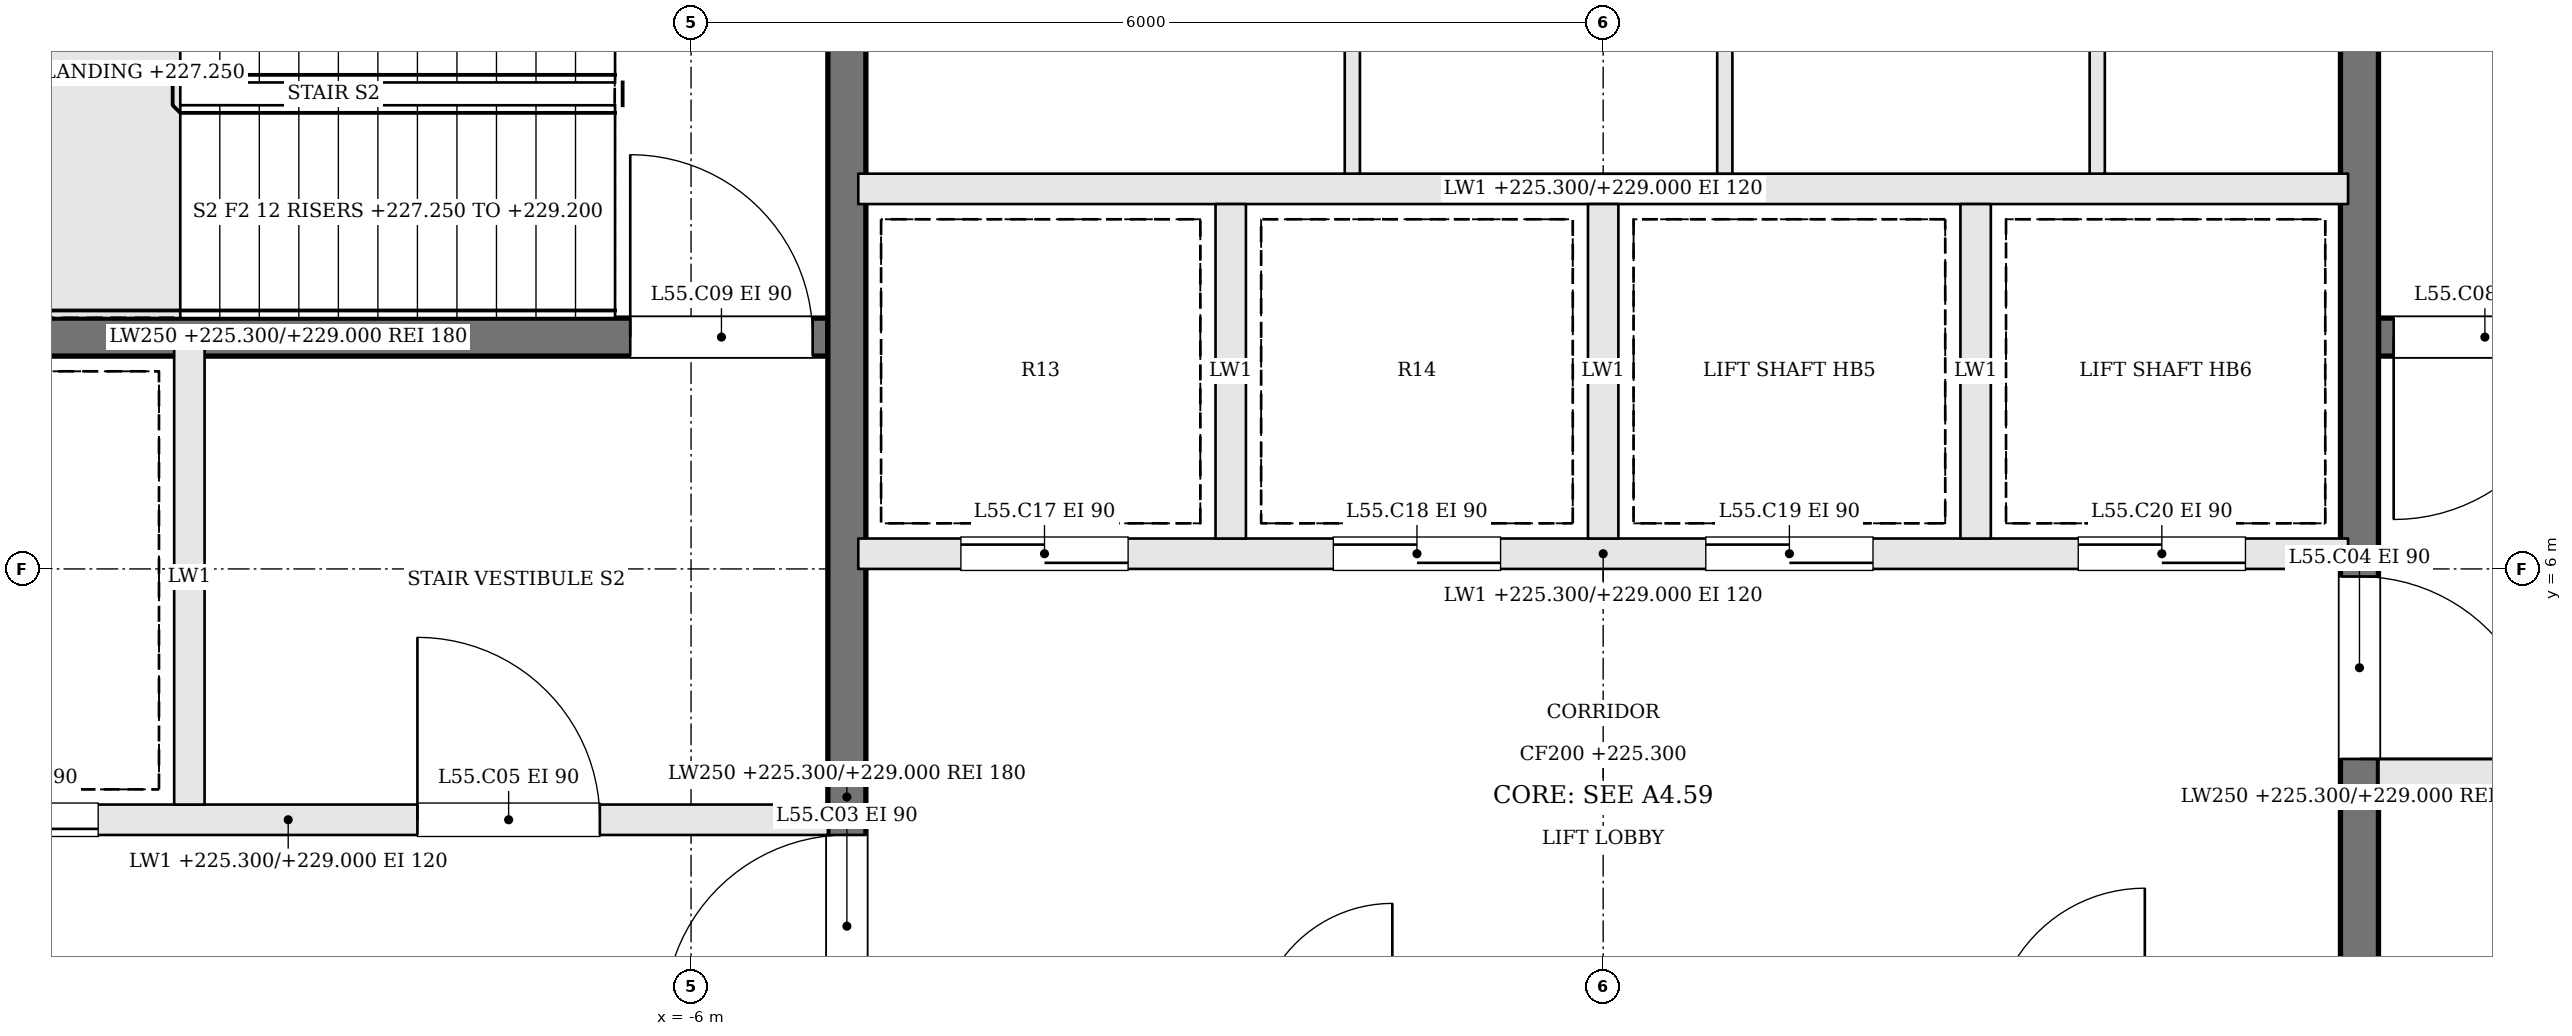
"""IFC4 building model, lengths in metres.
Left out: names, types, materials, properties, quantities, classifications, styles, units other than length and angle.
Written with IfcOpenShell. Run it as: python <this file> out.ifc"""

import sys

from ifc_helpers import new_model, si_unit, direction, frame, frame_2d, origin, place, context, subcontext, project, spatial, rectangle, extrude, element, fill, save


model = new_model("IFC4")
c1 = context("Model", 3, precision=1e-05, world=origin(), true_north=direction((0.0, 1.0)))
c2 = subcontext(c1, "Body", "Model", "MODEL_VIEW")
j1 = project(units=[si_unit("LENGTHUNIT", "METRE"), si_unit("PLANEANGLEUNIT", "RADIAN")], contexts=[c1])
p1 = place(None, origin())
s1 = spatial("IfcSite", under=j1, at=p1, CompositionType="ELEMENT")
p2 = place(p1, origin())
s2 = spatial("IfcBuilding", under=s1, at=p2, CompositionType="ELEMENT")
p3 = place(p2, frame((0.0, 0.0, 225.3)))
s3 = spatial("IfcBuildingStorey", under=s2, at=p3, CompositionType="ELEMENT", Elevation=225.3)
p4 = place(p3, frame((12.2, 7.525, 0.0), z_axis=(0.0, 0.0, 1.0), x_axis=(-1.0, 0.0, 0.0)))
e1 = element("IfcWall", 1, at=p4, inside=s3, PredefinedType="SOLIDWALL", context=c2, shape_type="SweptSolid", body=[
    extrude(rectangle(XDim=7.1, YDim=0.25, at=frame_2d((3.55, 0.0))), origin(), (0.0, 0.0, 1.0), 3.7),
])
p5 = place(p4, frame((5.8, 0.0, 0.0)))
e2 = element("IfcOpeningElement", 2, at=p5, cuts=e1, PredefinedType="OPENING", context=c2, shape_type="SweptSolid", body=[
    extrude(rectangle(XDim=1.2, YDim=2.1, at=frame_2d((0.6, 1.05))), frame((0.0, 0.135, 0.0), z_axis=(0.0, -1.0, 0.0), x_axis=(1.0, 0.0, 0.0)), (0.0, 0.0, 1.0), 0.27),
])
p6 = place(p3, frame((-12.2, 4.35, 0.0), z_axis=(0.0, 0.0, 1.0), x_axis=(1.0, 0.0, 0.0)))
e3 = element("IfcWall", 3, at=p6, inside=s3, PredefinedType="SOLIDWALL", context=c2, shape_type="SweptSolid", body=[
    extrude(rectangle(XDim=7.1, YDim=0.2, at=frame_2d((3.55, 0.0))), origin(), (0.0, 0.0, 1.0), 3.7),
])
p7 = place(p6, frame((4.4, 0.0, 0.0)))
e4 = element("IfcOpeningElement", 4, at=p7, cuts=e3, PredefinedType="OPENING", context=c2, shape_type="SweptSolid", body=[
    extrude(rectangle(XDim=1.2, YDim=2.1, at=frame_2d((0.6, 1.05))), frame((0.0, 0.11, 0.0), z_axis=(0.0, -1.0, 0.0), x_axis=(1.0, 0.0, 0.0)), (0.0, 0.0, 1.0), 0.22),
])
p8 = place(p6, frame((1.1, 0.0, 0.0)))
e5 = element("IfcOpeningElement", 5, at=p8, cuts=e3, PredefinedType="OPENING", context=c2, shape_type="SweptSolid", body=[
    extrude(rectangle(XDim=1.2, YDim=2.1, at=frame_2d((0.6, 1.05))), frame((0.0, 0.11, 0.0), z_axis=(0.0, -1.0, 0.0), x_axis=(1.0, 0.0, 0.0)), (0.0, 0.0, 1.0), 0.22),
])
p9 = place(p3, frame((12.2, 4.65, 0.0), z_axis=(0.0, 0.0, 1.0), x_axis=(-1.0, 0.0, 0.0)))
e6 = element("IfcWall", 6, at=p9, inside=s3, PredefinedType="SOLIDWALL", context=c2, shape_type="SweptSolid", body=[
    extrude(rectangle(XDim=7.1, YDim=0.2, at=frame_2d((3.55, 0.0))), origin(), (0.0, 0.0, 1.0), 3.7),
])
p10 = place(p9, frame((4.4, 0.0, 0.0)))
e7 = element("IfcOpeningElement", 7, at=p10, cuts=e6, PredefinedType="OPENING", context=c2, shape_type="SweptSolid", body=[
    extrude(rectangle(XDim=1.2, YDim=2.1, at=frame_2d((0.6, 1.05))), frame((0.0, 0.11, 0.0), z_axis=(0.0, -1.0, 0.0), x_axis=(1.0, 0.0, 0.0)), (0.0, 0.0, 1.0), 0.22),
])
p11 = place(p9, frame((1.1, 0.0, 0.0)))
e8 = element("IfcOpeningElement", 8, at=p11, cuts=e6, PredefinedType="OPENING", context=c2, shape_type="SweptSolid", body=[
    extrude(rectangle(XDim=1.2, YDim=2.1, at=frame_2d((0.6, 1.05))), frame((0.0, 0.11, 0.0), z_axis=(0.0, -1.0, 0.0), x_axis=(1.0, 0.0, 0.0)), (0.0, 0.0, 1.0), 0.22),
])
p12 = place(p3, frame((-12.2, 7.525, 0.0), z_axis=(0.0, 0.0, 1.0), x_axis=(1.0, 0.0, 0.0)))
e9 = element("IfcWall", 9, at=p12, inside=s3, PredefinedType="SOLIDWALL", context=c2, shape_type="SweptSolid", body=[
    extrude(rectangle(XDim=7.1, YDim=0.25, at=frame_2d((3.55, 0.0))), origin(), (0.0, 0.0, 1.0), 3.7),
])
p13 = place(p12, frame((5.8, 0.0, 0.0)))
e10 = element("IfcOpeningElement", 10, at=p13, cuts=e9, PredefinedType="OPENING", context=c2, shape_type="SweptSolid", body=[
    extrude(rectangle(XDim=1.2, YDim=2.1, at=frame_2d((0.6, 1.05))), frame((0.0, 0.135, 0.0), z_axis=(0.0, -1.0, 0.0), x_axis=(1.0, 0.0, 0.0)), (0.0, 0.0, 1.0), 0.27),
])
p14 = place(p3, frame((-9.3, 4.45, 0.0), z_axis=(0.0, 0.0, 1.0), x_axis=(0.0, 1.0, 0.0)))
e11 = element("IfcWall", 11, at=p14, inside=s3, PredefinedType="SOLIDWALL", context=c2, shape_type="SweptSolid", body=[
    extrude(rectangle(XDim=3.0, YDim=0.2, at=frame_2d((1.5, 0.0))), origin(), (0.0, 0.0, 1.0), 3.7),
])
p15 = place(p3, frame((-4.975, -2.2, 0.0), z_axis=(0.0, 0.0, 1.0), x_axis=(0.0, 1.0, 0.0)))
e12 = element("IfcWall", 12, at=p15, inside=s3, PredefinedType="SOLIDWALL", context=c2, shape_type="SweptSolid", body=[
    extrude(rectangle(XDim=13.4, YDim=0.25, at=frame_2d((6.7, 0.0))), origin(), (0.0, 0.0, 1.0), 3.7),
])
p16 = place(p15, frame((5.25, 0.0, 0.0)))
e13 = element("IfcOpeningElement", 13, at=p16, cuts=e12, PredefinedType="OPENING", context=c2, shape_type="SweptSolid", body=[
    extrude(rectangle(XDim=1.2, YDim=2.1, at=frame_2d((0.6, 1.05))), frame((0.0, 0.135, 0.0), z_axis=(0.0, -1.0, 0.0), x_axis=(1.0, 0.0, 0.0)), (0.0, 0.0, 1.0), 0.27),
])
p17 = place(p3, frame((4.975, 11.2, 0.0), z_axis=(0.0, 0.0, 1.0), x_axis=(0.0, -1.0, 0.0)))
e14 = element("IfcWall", 14, at=p17, inside=s3, PredefinedType="SOLIDWALL", context=c2, shape_type="SweptSolid", body=[
    extrude(rectangle(XDim=13.4, YDim=0.25, at=frame_2d((6.7, 0.0))), origin(), (0.0, 0.0, 1.0), 3.7),
])
p18 = place(p17, frame((5.25, 0.0, 0.0)))
e15 = element("IfcOpeningElement", 15, at=p18, cuts=e14, PredefinedType="OPENING", context=c2, shape_type="SweptSolid", body=[
    extrude(rectangle(XDim=1.2, YDim=2.1, at=frame_2d((0.6, 1.05))), frame((0.0, 0.135, 0.0), z_axis=(0.0, -1.0, 0.0), x_axis=(1.0, 0.0, 0.0)), (0.0, 0.0, 1.0), 0.27),
])
p19 = place(p3, frame((-4.9, 6.1, 0.0), z_axis=(0.0, 0.0, 1.0), x_axis=(1.0, 0.0, 0.0)))
e16 = element("IfcWall", 16, at=p19, inside=s3, PredefinedType="SOLIDWALL", context=c2, shape_type="SweptSolid", body=[
    extrude(rectangle(XDim=9.8, YDim=0.2, at=frame_2d((4.9, 0.0))), origin(), (0.0, 0.0, 1.0), 3.7),
])
p20 = place(p19, frame((0.675, 0.0, 0.0)))
e17 = element("IfcOpeningElement", 17, at=p20, cuts=e16, PredefinedType="OPENING", context=c2, shape_type="SweptSolid", body=[
    extrude(rectangle(XDim=1.1, YDim=2.1, at=frame_2d((0.55, 1.05))), frame((0.0, 0.11, 0.0), z_axis=(0.0, -1.0, 0.0), x_axis=(1.0, 0.0, 0.0)), (0.0, 0.0, 1.0), 0.22),
])
p21 = place(p19, frame((3.125, 0.0, 0.0)))
e18 = element("IfcOpeningElement", 18, at=p21, cuts=e16, PredefinedType="OPENING", context=c2, shape_type="SweptSolid", body=[
    extrude(rectangle(XDim=1.1, YDim=2.1, at=frame_2d((0.55, 1.05))), frame((0.0, 0.11, 0.0), z_axis=(0.0, -1.0, 0.0), x_axis=(1.0, 0.0, 0.0)), (0.0, 0.0, 1.0), 0.22),
])
p22 = place(p19, frame((5.575, 0.0, 0.0)))
e19 = element("IfcOpeningElement", 19, at=p22, cuts=e16, PredefinedType="OPENING", context=c2, shape_type="SweptSolid", body=[
    extrude(rectangle(XDim=1.1, YDim=2.1, at=frame_2d((0.55, 1.05))), frame((0.0, 0.11, 0.0), z_axis=(0.0, -1.0, 0.0), x_axis=(1.0, 0.0, 0.0)), (0.0, 0.0, 1.0), 0.22),
])
p23 = place(p19, frame((8.025, 0.0, 0.0)))
e20 = element("IfcOpeningElement", 20, at=p23, cuts=e16, PredefinedType="OPENING", context=c2, shape_type="SweptSolid", body=[
    extrude(rectangle(XDim=1.1, YDim=2.1, at=frame_2d((0.55, 1.05))), frame((0.0, 0.11, 0.0), z_axis=(0.0, -1.0, 0.0), x_axis=(1.0, 0.0, 0.0)), (0.0, 0.0, 1.0), 0.22),
])
p24 = place(p3, frame((-4.9, 8.5, 0.0), z_axis=(0.0, 0.0, 1.0), x_axis=(1.0, 0.0, 0.0)))
e21 = element("IfcWall", 21, at=p24, inside=s3, PredefinedType="SOLIDWALL", context=c2, shape_type="SweptSolid", body=[
    extrude(rectangle(XDim=9.8, YDim=0.2, at=frame_2d((4.9, 0.0))), origin(), (0.0, 0.0, 1.0), 3.7),
])
for number, where, z_axis, x_axis in (
    (22, (-2.45, 6.2, 0.0), (0.0, 0.0, 1.0), (0.0, 1.0, 0.0)),
    (23, (0.0, 6.2, 0.0), (0.0, 0.0, 1.0), (0.0, 1.0, 0.0)),
    (24, (2.45, 6.2, 0.0), (0.0, 0.0, 1.0), (0.0, 1.0, 0.0)),
):
    element("IfcWall", number, at=place(p3, frame(where, z_axis=z_axis, x_axis=x_axis)), inside=s3, PredefinedType="SOLIDWALL", context=c2, shape_type="SweptSolid", body=[
        extrude(rectangle(XDim=2.2, YDim=0.2, at=frame_2d((1.1, 0.0))), origin(), (0.0, 0.0, 1.0), 3.7),
    ])
for number, where, z_axis, x_axis in (
    (25, (-1.65, 8.6, 0.0), (0.0, 0.0, 1.0), (0.0, 1.0, 0.0)),
    (26, (0.8, 8.6, 0.0), (0.0, 0.0, 1.0), (0.0, 1.0, 0.0)),
    (27, (3.25, 8.6, 0.0), (0.0, 0.0, 1.0), (0.0, 1.0, 0.0)),
):
    element("IfcWall", number, at=place(p3, frame(where, z_axis=z_axis, x_axis=x_axis)), inside=s3, PredefinedType="PARTITIONING", context=c2, shape_type="SweptSolid", body=[
        extrude(rectangle(XDim=2.6, YDim=0.1, at=frame_2d((1.3, 0.0))), origin(), (0.0, 0.0, 1.0), 3.7),
    ])
p25 = place(p16, origin())
e28 = element("IfcDoor", 28, at=p25, inside=s3, OperationType="SINGLE_SWING_LEFT", PredefinedType="DOOR", context=c2, shape_type="SweptSolid", body=[
    extrude(rectangle(XDim=1.2, YDim=2.1, at=frame_2d((0.6, 1.05))), frame((0.0, 0.025, 0.0), z_axis=(0.0, -1.0, 0.0), x_axis=(1.0, 0.0, 0.0)), (0.0, 0.0, 1.0), 0.05),
])
fill(e13, e28)
p26 = place(p18, origin())
e29 = element("IfcDoor", 29, at=p26, inside=s3, OperationType="SINGLE_SWING_RIGHT", PredefinedType="DOOR", context=c2, shape_type="SweptSolid", body=[
    extrude(rectangle(XDim=1.2, YDim=2.1, at=frame_2d((0.6, 1.05))), frame((0.0, 0.025, 0.0), z_axis=(0.0, -1.0, 0.0), x_axis=(1.0, 0.0, 0.0)), (0.0, 0.0, 1.0), 0.05),
])
fill(e15, e29)
p27 = place(p7, origin())
e30 = element("IfcDoor", 30, at=p27, inside=s3, OperationType="SINGLE_SWING_LEFT", PredefinedType="DOOR", context=c2, shape_type="SweptSolid", body=[
    extrude(rectangle(XDim=1.2, YDim=2.1, at=frame_2d((0.6, 1.05))), frame((0.0, 0.025, 0.0), z_axis=(0.0, -1.0, 0.0), x_axis=(1.0, 0.0, 0.0)), (0.0, 0.0, 1.0), 0.05),
])
fill(e4, e30)
p28 = place(p5, origin())
e31 = element("IfcDoor", 31, at=p28, inside=s3, OperationType="SINGLE_SWING_RIGHT", PredefinedType="DOOR", context=c2, shape_type="SweptSolid", body=[
    extrude(rectangle(XDim=1.2, YDim=2.1, at=frame_2d((0.6, 1.05))), frame((0.0, 0.025, 0.0), z_axis=(0.0, -1.0, 0.0), x_axis=(1.0, 0.0, 0.0)), (0.0, 0.0, 1.0), 0.05),
])
fill(e2, e31)
p29 = place(p13, origin())
e32 = element("IfcDoor", 32, at=p29, inside=s3, OperationType="SINGLE_SWING_LEFT", PredefinedType="DOOR", context=c2, shape_type="SweptSolid", body=[
    extrude(rectangle(XDim=1.2, YDim=2.1, at=frame_2d((0.6, 1.05))), frame((0.0, 0.025, 0.0), z_axis=(0.0, -1.0, 0.0), x_axis=(1.0, 0.0, 0.0)), (0.0, 0.0, 1.0), 0.05),
])
fill(e10, e32)
p30 = place(p8, origin())
e33 = element("IfcDoor", 33, at=p30, inside=s3, OperationType="SLIDING_TO_RIGHT", PredefinedType="DOOR", context=c2, shape_type="SweptSolid", body=[
    extrude(rectangle(XDim=1.2, YDim=2.1, at=frame_2d((0.6, 1.05))), frame((0.0, 0.025, 0.0), z_axis=(0.0, -1.0, 0.0), x_axis=(1.0, 0.0, 0.0)), (0.0, 0.0, 1.0), 0.05),
])
fill(e5, e33)
p31 = place(p20, origin())
e34 = element("IfcDoor", 34, at=p31, inside=s3, OperationType="SLIDING_TO_RIGHT", PredefinedType="DOOR", context=c2, shape_type="SweptSolid", body=[
    extrude(rectangle(XDim=1.1, YDim=2.1, at=frame_2d((0.55, 1.05))), frame((0.0, 0.025, 0.0), z_axis=(0.0, -1.0, 0.0), x_axis=(1.0, 0.0, 0.0)), (0.0, 0.0, 1.0), 0.05),
])
fill(e17, e34)
p32 = place(p21, origin())
e35 = element("IfcDoor", 35, at=p32, inside=s3, OperationType="SLIDING_TO_LEFT", PredefinedType="DOOR", context=c2, shape_type="SweptSolid", body=[
    extrude(rectangle(XDim=1.1, YDim=2.1, at=frame_2d((0.55, 1.05))), frame((0.0, 0.025, 0.0), z_axis=(0.0, -1.0, 0.0), x_axis=(1.0, 0.0, 0.0)), (0.0, 0.0, 1.0), 0.05),
])
fill(e18, e35)
p33 = place(p22, origin())
e36 = element("IfcDoor", 36, at=p33, inside=s3, OperationType="SLIDING_TO_RIGHT", PredefinedType="DOOR", context=c2, shape_type="SweptSolid", body=[
    extrude(rectangle(XDim=1.1, YDim=2.1, at=frame_2d((0.55, 1.05))), frame((0.0, 0.025, 0.0), z_axis=(0.0, -1.0, 0.0), x_axis=(1.0, 0.0, 0.0)), (0.0, 0.0, 1.0), 0.05),
])
fill(e19, e36)
p34 = place(p23, origin())
e37 = element("IfcDoor", 37, at=p34, inside=s3, OperationType="SLIDING_TO_LEFT", PredefinedType="DOOR", context=c2, shape_type="SweptSolid", body=[
    extrude(rectangle(XDim=1.1, YDim=2.1, at=frame_2d((0.55, 1.05))), frame((0.0, 0.025, 0.0), z_axis=(0.0, -1.0, 0.0), x_axis=(1.0, 0.0, 0.0)), (0.0, 0.0, 1.0), 0.05),
])
fill(e20, e37)
save(model, sys.argv[1])
